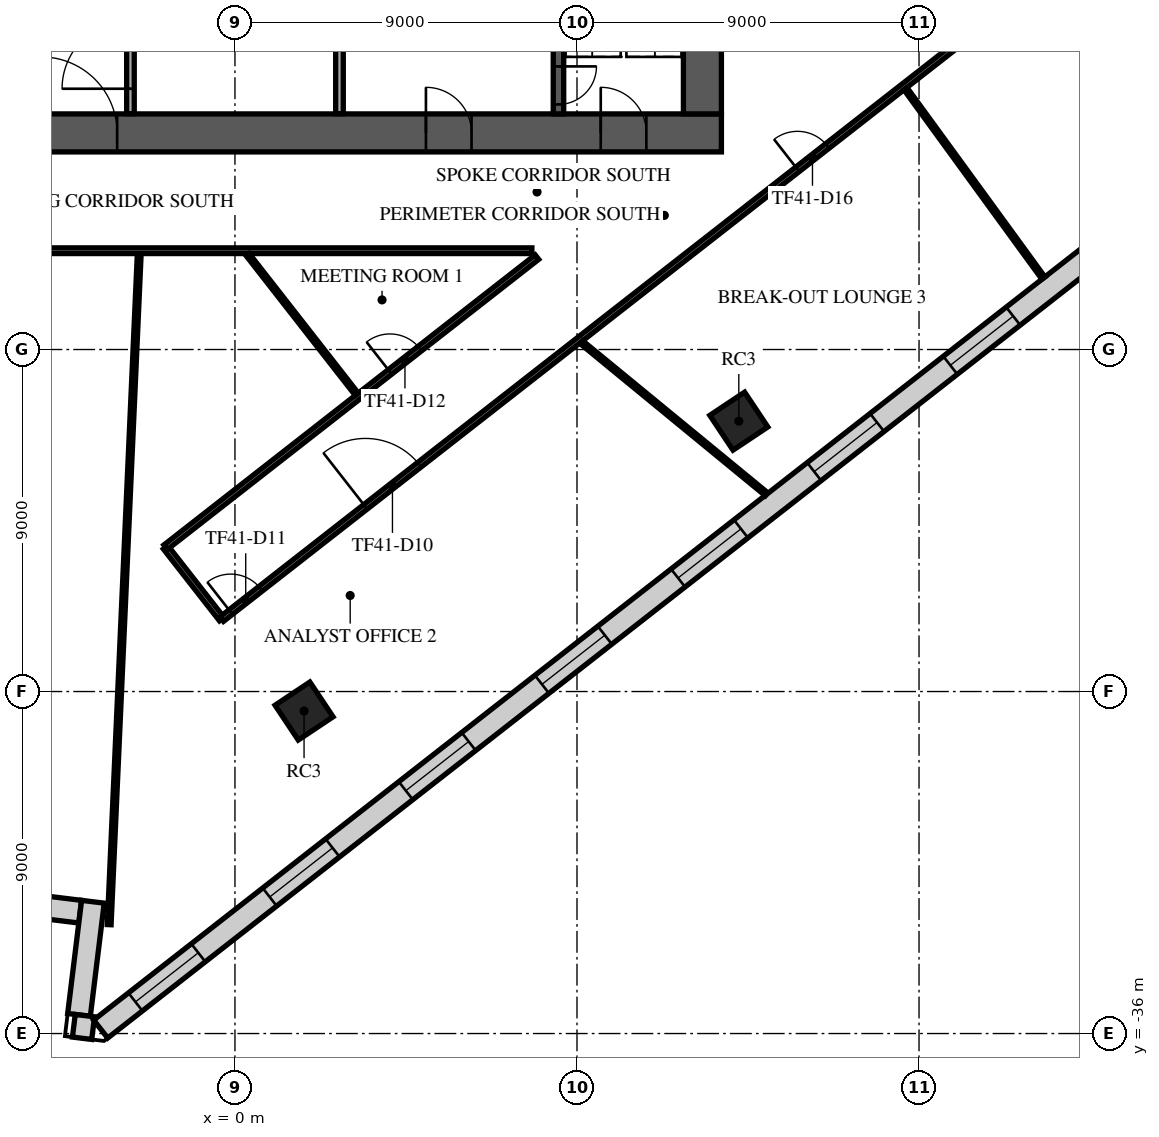
"""IFC4 building model, lengths in metres.
Left out: names, types, materials, properties, quantities, classifications, styles, units other than length and angle.
Written with IfcOpenShell. Run it as: python <this file> out.ifc"""

import sys

from ifc_helpers import new_model, si_unit, direction, frame, frame_2d, origin, origin_2d, place, context, subcontext, project, spatial, rectangle, extrude, element, fill, save


model = new_model("IFC4")
c1 = context("Model", 3, precision=1e-05, world=origin(), true_north=direction((0.0, 1.0)))
c2 = subcontext(c1, "Body", "Model", "MODEL_VIEW")
j1 = project(units=[si_unit("LENGTHUNIT", "METRE"), si_unit("PLANEANGLEUNIT", "RADIAN")], contexts=[c1])
p1 = place(None, origin())
s1 = spatial("IfcSite", under=j1, at=p1, CompositionType="ELEMENT")
p2 = place(p1, origin())
s2 = spatial("IfcBuilding", under=s1, at=p2, CompositionType="ELEMENT")
p3 = place(p2, frame((0.0, 0.0, 175.7)))
s3 = spatial("IfcBuildingStorey", under=s2, at=p3, CompositionType="ELEMENT", Elevation=175.7)
for number, where, z_axis, x_axis in (
    (1, (1.818, -27.513, 0.0), (0.0, 0.0, 1.0), (0.832, 0.555, 0.0)),
    (2, (13.258, -19.885, 0.0), (0.0, 0.0, 1.0), (0.832, 0.555, 0.0)),
):
    element("IfcColumn", number, at=place(p3, frame(where, z_axis=z_axis, x_axis=x_axis)), inside=s3, PredefinedType="COLUMN", context=c2, shape_type="SweptSolid", body=[
        extrude(rectangle(XDim=1.1, YDim=1.1, at=origin_2d()), origin(), (0.0, 0.0, 1.0), 4.0),
    ])
p4 = place(p3, frame((-12.8, -12.3, 0.0), z_axis=(0.0, 0.0, 1.0), x_axis=(1.0, 0.0, 0.0)))
e3 = element("IfcWall", 3, at=p4, inside=s3, PredefinedType="SHEAR", context=c2, shape_type="SweptSolid", body=[
    extrude(rectangle(XDim=25.6, YDim=1.0, at=frame_2d((12.8, 0.0))), origin(), (0.0, 0.0, 1.0), 3.6),
])
p5 = place(p4, frame((7.7, 0.0, 0.0)))
e4 = element("IfcOpeningElement", 4, at=p5, cuts=e3, PredefinedType="OPENING", context=c2, shape_type="SweptSolid", body=[
    extrude(rectangle(XDim=2.0, YDim=2.1, at=frame_2d((1.0, 1.05))), frame((0.0, 0.51, 0.0), z_axis=(0.0, -1.0, 0.0), x_axis=(1.0, 0.0, 0.0)), (0.0, 0.0, 1.0), 1.02),
])
p6 = place(p4, frame((17.825, 0.0, 0.0)))
e5 = element("IfcOpeningElement", 5, at=p6, cuts=e3, PredefinedType="OPENING", context=c2, shape_type="SweptSolid", body=[
    extrude(rectangle(XDim=1.2, YDim=2.1, at=frame_2d((0.6, 1.05))), frame((0.0, 0.51, 0.0), z_axis=(0.0, -1.0, 0.0), x_axis=(1.0, 0.0, 0.0)), (0.0, 0.0, 1.0), 1.02),
])
p7 = place(p4, frame((1.975, 0.0, 0.0)))
e6 = element("IfcOpeningElement", 6, at=p7, cuts=e3, PredefinedType="OPENING", context=c2, shape_type="SweptSolid", body=[
    extrude(rectangle(XDim=1.2, YDim=2.1, at=frame_2d((0.6, 1.05))), frame((0.0, 0.51, 0.0), z_axis=(0.0, -1.0, 0.0), x_axis=(1.0, 0.0, 0.0)), (0.0, 0.0, 1.0), 1.02),
])
p8 = place(p4, frame((22.425, 0.0, 0.0)))
e7 = element("IfcOpeningElement", 7, at=p8, cuts=e3, PredefinedType="OPENING", context=c2, shape_type="SweptSolid", body=[
    extrude(rectangle(XDim=1.2, YDim=2.1, at=frame_2d((0.6, 1.05))), frame((0.0, 0.51, 0.0), z_axis=(0.0, -1.0, 0.0), x_axis=(1.0, 0.0, 0.0)), (0.0, 0.0, 1.0), 1.02),
])
p9 = place(p3, frame((12.3, -11.8, 0.0), z_axis=(0.0, 0.0, 1.0), x_axis=(0.0, 1.0, 0.0)))
e8 = element("IfcWall", 8, at=p9, inside=s3, PredefinedType="SHEAR", context=c2, shape_type="SweptSolid", body=[
    extrude(rectangle(XDim=23.6, YDim=1.0, at=frame_2d((11.8, 0.0))), origin(), (0.0, 0.0, 1.0), 3.6),
])
p10 = place(p9, frame((10.6, 0.0, 0.0)))
e9 = element("IfcOpeningElement", 9, at=p10, cuts=e8, PredefinedType="OPENING", context=c2, shape_type="SweptSolid", body=[
    extrude(rectangle(XDim=2.4, YDim=2.4, at=frame_2d((1.2, 1.2))), frame((0.0, 0.51, 0.0), z_axis=(0.0, -1.0, 0.0), x_axis=(1.0, 0.0, 0.0)), (0.0, 0.0, 1.0), 1.02),
])
p11 = place(p3, frame((8.512, -4.55, 0.0), z_axis=(0.0, 0.0, 1.0), x_axis=(0.0, -1.0, 0.0)))
e10 = element("IfcWall", 10, at=p11, inside=s3, PredefinedType="SOLIDWALL", context=c2, shape_type="SweptSolid", body=[
    extrude(rectangle(XDim=7.25, YDim=0.275, at=frame_2d((3.625, 0.0))), origin(), (0.0, 0.0, 1.0), 3.6),
])
p12 = place(p11, frame((6.0, 0.0, 0.0)))
e11 = element("IfcOpeningElement", 11, at=p12, cuts=e10, PredefinedType="OPENING", context=c2, shape_type="SweptSolid", body=[
    extrude(rectangle(XDim=1.0, YDim=2.1, at=frame_2d((0.5, 1.05))), frame((0.0, 0.147, 0.0), z_axis=(0.0, -1.0, 0.0), x_axis=(1.0, 0.0, 0.0)), (0.0, 0.0, 1.0), 0.295),
])
p13 = place(p3, frame((-2.75, -11.795, 0.0), z_axis=(0.0, 0.0, 1.0), x_axis=(0.0, 1.0, 0.0)))
e12 = element("IfcWall", 12, at=p13, inside=s3, PredefinedType="PARTITIONING", context=c2, shape_type="SweptSolid", body=[
    extrude(rectangle(XDim=2.99, YDim=0.2, at=frame_2d((1.495, 0.0))), origin(), (0.0, 0.0, 1.0), 3.6),
])
p14 = place(p13, frame((0.657, 0.0, 0.0)))
e13 = element("IfcOpeningElement", 13, at=p14, cuts=e12, PredefinedType="OPENING", context=c2, shape_type="SweptSolid", body=[
    extrude(rectangle(XDim=1.8, YDim=2.1, at=frame_2d((0.9, 1.05))), frame((0.0, 0.11, 0.0), z_axis=(0.0, -1.0, 0.0), x_axis=(1.0, 0.0, 0.0)), (0.0, 0.0, 1.0), 0.22),
])
p15 = place(p3, frame((2.75, -11.795, 0.0), z_axis=(0.0, 0.0, 1.0), x_axis=(0.0, 1.0, 0.0)))
e14 = element("IfcWall", 14, at=p15, inside=s3, PredefinedType="PARTITIONING", context=c2, shape_type="SweptSolid", body=[
    extrude(rectangle(XDim=2.99, YDim=0.2, at=frame_2d((1.495, 0.0))), origin(), (0.0, 0.0, 1.0), 3.6),
])
p16 = place(p3, frame((-9.035, -32.184, 0.0), z_axis=(0.0, 0.0, 1.0), x_axis=(0.992545217041, -0.121876954874, 0.0)))
e15 = element("IfcWall", 15, at=p16, inside=s3, PredefinedType="STANDARD", context=c2, shape_type="SweptSolid", body=[
    extrude(rectangle(XDim=5.0, YDim=0.6, at=frame_2d((2.5, 0.0))), origin(), (0.0, 0.0, 1.0), 3.6),
])
p17 = place(p16, frame((1.2, 0.0, 0.9)))
e16 = element("IfcOpeningElement", 16, at=p17, cuts=e15, PredefinedType="OPENING", context=c2, shape_type="SweptSolid", body=[
    extrude(rectangle(XDim=2.6, YDim=2.1, at=frame_2d((1.3, 1.05))), frame((0.0, 0.31, 0.0), z_axis=(0.0, -1.0, 0.0), x_axis=(1.0, 0.0, 0.0)), (0.0, 0.0, 1.0), 0.62),
])
p18 = place(p3, frame((-3.738, -32.532, 0.0), z_axis=(0.0, 0.0, 1.0), x_axis=(-0.121901146576, -0.992542246186, 0.0)))
e17 = element("IfcWall", 17, at=p18, inside=s3, PredefinedType="STANDARD", context=c2, shape_type="SweptSolid", body=[
    extrude(rectangle(XDim=3.0, YDim=0.6, at=frame_2d((1.5, 0.0))), origin(), (0.0, 0.0, 1.0), 3.6),
])
p19 = place(p3, frame((-4.24, -35.795, 0.0), z_axis=(0.0, 0.0, 1.0), x_axis=(0.992554603024, -0.121800492671, 0.0)))
e18 = element("IfcWall", 18, at=p19, inside=s3, PredefinedType="STANDARD", context=c2, shape_type="SweptSolid", body=[
    extrude(rectangle(XDim=0.511, YDim=0.6, at=frame_2d((0.256, 0.0))), origin(), (0.0, 0.0, 1.0), 3.6),
])
p20 = place(p3, frame((-3.534, -35.882, 0.0), z_axis=(0.0, 0.0, 1.0), x_axis=(0.788011205374, 0.61566089709, 0.0)))
e19 = element("IfcWall", 19, at=p20, inside=s3, PredefinedType="STANDARD", context=c2, shape_type="SweptSolid", body=[
    extrude(rectangle(XDim=49.752, YDim=0.6, at=frame_2d((24.876, 0.0))), origin(), (0.0, 0.0, 1.0), 3.6),
])
p21 = place(p20, frame((1.161, 0.0, 0.9)))
e20 = element("IfcOpeningElement", 20, at=p21, cuts=e19, PredefinedType="OPENING", context=c2, shape_type="SweptSolid", body=[
    extrude(rectangle(XDim=2.1, YDim=2.1, at=frame_2d((1.05, 1.05))), frame((0.0, 0.31, 0.0), z_axis=(0.0, -1.0, 0.0), x_axis=(1.0, 0.0, 0.0)), (0.0, 0.0, 1.0), 0.62),
])
p22 = place(p20, frame((5.644, 0.0, 0.9)))
e21 = element("IfcOpeningElement", 21, at=p22, cuts=e19, PredefinedType="OPENING", context=c2, shape_type="SweptSolid", body=[
    extrude(rectangle(XDim=2.1, YDim=2.1, at=frame_2d((1.05, 1.05))), frame((0.0, 0.31, 0.0), z_axis=(0.0, -1.0, 0.0), x_axis=(1.0, 0.0, 0.0)), (0.0, 0.0, 1.0), 0.62),
])
p23 = place(p20, frame((10.189, 0.0, 0.9)))
e22 = element("IfcOpeningElement", 22, at=p23, cuts=e19, PredefinedType="OPENING", context=c2, shape_type="SweptSolid", body=[
    extrude(rectangle(XDim=2.1, YDim=2.1, at=frame_2d((1.05, 1.05))), frame((0.0, 0.31, 0.0), z_axis=(0.0, -1.0, 0.0), x_axis=(1.0, 0.0, 0.0)), (0.0, 0.0, 1.0), 0.62),
])
p24 = place(p20, frame((14.735, 0.0, 0.9)))
e23 = element("IfcOpeningElement", 23, at=p24, cuts=e19, PredefinedType="OPENING", context=c2, shape_type="SweptSolid", body=[
    extrude(rectangle(XDim=2.1, YDim=2.1, at=frame_2d((1.05, 1.05))), frame((0.0, 0.31, 0.0), z_axis=(0.0, -1.0, 0.0), x_axis=(1.0, 0.0, 0.0)), (0.0, 0.0, 1.0), 0.62),
])
p25 = place(p20, frame((19.28, 0.0, 0.9)))
e24 = element("IfcOpeningElement", 24, at=p25, cuts=e19, PredefinedType="OPENING", context=c2, shape_type="SweptSolid", body=[
    extrude(rectangle(XDim=2.1, YDim=2.1, at=frame_2d((1.05, 1.05))), frame((0.0, 0.31, 0.0), z_axis=(0.0, -1.0, 0.0), x_axis=(1.0, 0.0, 0.0)), (0.0, 0.0, 1.0), 0.62),
])
p26 = place(p20, frame((23.826, 0.0, 0.9)))
e25 = element("IfcOpeningElement", 25, at=p26, cuts=e19, PredefinedType="OPENING", context=c2, shape_type="SweptSolid", body=[
    extrude(rectangle(XDim=2.1, YDim=2.1, at=frame_2d((1.05, 1.05))), frame((0.0, 0.31, 0.0), z_axis=(0.0, -1.0, 0.0), x_axis=(1.0, 0.0, 0.0)), (0.0, 0.0, 1.0), 0.62),
])
p27 = place(p20, frame((28.371, 0.0, 0.9)))
e26 = element("IfcOpeningElement", 26, at=p27, cuts=e19, PredefinedType="OPENING", context=c2, shape_type="SweptSolid", body=[
    extrude(rectangle(XDim=2.1, YDim=2.1, at=frame_2d((1.05, 1.05))), frame((0.0, 0.31, 0.0), z_axis=(0.0, -1.0, 0.0), x_axis=(1.0, 0.0, 0.0)), (0.0, 0.0, 1.0), 0.62),
])
p28 = place(p20, frame((32.917, 0.0, 0.9)))
e27 = element("IfcOpeningElement", 27, at=p28, cuts=e19, PredefinedType="OPENING", context=c2, shape_type="SweptSolid", body=[
    extrude(rectangle(XDim=2.1, YDim=2.1, at=frame_2d((1.05, 1.05))), frame((0.0, 0.31, 0.0), z_axis=(0.0, -1.0, 0.0), x_axis=(1.0, 0.0, 0.0)), (0.0, 0.0, 1.0), 0.62),
])
p29 = place(p20, frame((37.462, 0.0, 0.9)))
e28 = element("IfcOpeningElement", 28, at=p29, cuts=e19, PredefinedType="OPENING", context=c2, shape_type="SweptSolid", body=[
    extrude(rectangle(XDim=2.1, YDim=2.1, at=frame_2d((1.05, 1.05))), frame((0.0, 0.31, 0.0), z_axis=(0.0, -1.0, 0.0), x_axis=(1.0, 0.0, 0.0)), (0.0, 0.0, 1.0), 0.62),
])
p30 = place(p20, frame((42.008, 0.0, 0.9)))
e29 = element("IfcOpeningElement", 29, at=p30, cuts=e19, PredefinedType="OPENING", context=c2, shape_type="SweptSolid", body=[
    extrude(rectangle(XDim=2.1, YDim=2.1, at=frame_2d((1.05, 1.05))), frame((0.0, 0.31, 0.0), z_axis=(0.0, -1.0, 0.0), x_axis=(1.0, 0.0, 0.0)), (0.0, 0.0, 1.0), 0.62),
])
p31 = place(p20, frame((46.491, 0.0, 0.9)))
e30 = element("IfcOpeningElement", 30, at=p31, cuts=e19, PredefinedType="OPENING", context=c2, shape_type="SweptSolid", body=[
    extrude(rectangle(XDim=2.1, YDim=2.1, at=frame_2d((1.05, 1.05))), frame((0.0, 0.31, 0.0), z_axis=(0.0, -1.0, 0.0), x_axis=(1.0, 0.0, 0.0)), (0.0, 0.0, 1.0), 0.62),
])
p32 = place(p3, frame((-14.312, -15.4, 0.0), z_axis=(0.0, 0.0, 1.0), x_axis=(1.0, 0.0, 0.0)))
e31 = element("IfcWall", 31, at=p32, inside=s3, PredefinedType="PARTITIONING", context=c2, shape_type="SweptSolid", body=[
    extrude(rectangle(XDim=22.125, YDim=0.15, at=frame_2d((11.062, 0.0))), origin(), (0.0, 0.0, 1.0), 3.15),
])
p33 = place(p3, frame((-1.825, -23.204, 0.0), z_axis=(0.0, 0.0, 1.0), x_axis=(0.615792170082, -0.787908626216, 0.0)))
e32 = element("IfcWall", 32, at=p33, inside=s3, PredefinedType="PARTITIONING", context=c2, shape_type="SweptSolid", body=[
    extrude(rectangle(XDim=2.399, YDim=0.15, at=frame_2d((1.199, 0.0))), origin(), (0.0, 0.0, 1.0), 3.6),
])
p34 = place(p3, frame((-1.825, -23.203, 0.0), z_axis=(0.0, 0.0, 1.0), x_axis=(0.788016612455, 0.615653976269, 0.0)))
e33 = element("IfcWall", 33, at=p34, inside=s3, PredefinedType="PARTITIONING", context=c2, shape_type="SweptSolid", body=[
    extrude(rectangle(XDim=12.399, YDim=0.15, at=frame_2d((6.2, 0.0))), origin(), (0.0, 0.0, 1.0), 3.15),
])
p35 = place(p34, frame((7.492, 0.0, 0.0)))
e34 = element("IfcOpeningElement", 34, at=p35, cuts=e33, PredefinedType="OPENING", context=c2, shape_type="SweptSolid", body=[
    extrude(rectangle(XDim=1.0, YDim=2.1, at=frame_2d((0.5, 1.05))), frame((0.0, 0.085, 0.0), z_axis=(0.0, -1.0, 0.0), x_axis=(1.0, 0.0, 0.0)), (0.0, 0.0, 1.0), 0.17),
])
p36 = place(p3, frame((-0.348, -25.095, 0.0), z_axis=(0.0, 0.0, 1.0), x_axis=(0.788010131951, 0.615662271008, 0.0)))
e35 = element("IfcWall", 35, at=p36, inside=s3, PredefinedType="PARTITIONING", context=c2, shape_type="SweptSolid", body=[
    extrude(rectangle(XDim=31.448, YDim=0.15, at=frame_2d((15.724, 0.0))), origin(), (0.0, 0.0, 1.0), 3.15),
])
p37 = place(p36, frame((4.801, 0.0, 0.0)))
e36 = element("IfcOpeningElement", 36, at=p37, cuts=e35, PredefinedType="OPENING", context=c2, shape_type="SweptSolid", body=[
    extrude(rectangle(XDim=1.8, YDim=2.1, at=frame_2d((0.9, 1.05))), frame((0.0, 0.085, 0.0), z_axis=(0.0, -1.0, 0.0), x_axis=(1.0, 0.0, 0.0)), (0.0, 0.0, 1.0), 0.17),
])
p38 = place(p36, frame((0.301, 0.0, 0.0)))
e37 = element("IfcOpeningElement", 37, at=p38, cuts=e35, PredefinedType="OPENING", context=c2, shape_type="SweptSolid", body=[
    extrude(rectangle(XDim=1.0, YDim=2.1, at=frame_2d((0.5, 1.05))), frame((0.0, 0.085, 0.0), z_axis=(0.0, -1.0, 0.0), x_axis=(1.0, 0.0, 0.0)), (0.0, 0.0, 1.0), 0.17),
])
p39 = place(p36, frame((19.226, 0.0, 0.0)))
e38 = element("IfcOpeningElement", 38, at=p39, cuts=e35, PredefinedType="OPENING", context=c2, shape_type="SweptSolid", body=[
    extrude(rectangle(XDim=1.0, YDim=2.1, at=frame_2d((0.5, 1.05))), frame((0.0, 0.085, 0.0), z_axis=(0.0, -1.0, 0.0), x_axis=(1.0, 0.0, 0.0)), (0.0, 0.0, 1.0), 0.17),
])
p40 = place(p36, frame((30.072, 0.0, 0.0)))
e39 = element("IfcOpeningElement", 39, at=p40, cuts=e35, PredefinedType="OPENING", context=c2, shape_type="SweptSolid", body=[
    extrude(rectangle(XDim=1.0, YDim=2.1, at=frame_2d((0.5, 1.05))), frame((0.0, 0.085, 0.0), z_axis=(0.0, -1.0, 0.0), x_axis=(1.0, 0.0, 0.0)), (0.0, 0.0, 1.0), 0.17),
])
p41 = place(p3, frame((-3.31, -33.135, 0.0), z_axis=(0.0, 0.0, 1.0), x_axis=(0.044752286744, 0.998998114528, 0.0)))
e40 = element("IfcWall", 40, at=p41, inside=s3, PredefinedType="PARTITIONING", context=c2, shape_type="SweptSolid", body=[
    extrude(rectangle(XDim=17.676, YDim=0.1, at=frame_2d((8.838, 0.0))), origin(), (0.0, 0.0, 1.0), 2.9),
])
p42 = place(p3, frame((0.337, -15.506, 0.0), z_axis=(0.0, 0.0, 1.0), x_axis=(0.615683690883, -0.787993396407, 0.0)))
e41 = element("IfcWall", 41, at=p42, inside=s3, PredefinedType="PARTITIONING", context=c2, shape_type="SweptSolid", body=[
    extrude(rectangle(XDim=4.66, YDim=0.1, at=frame_2d((2.33, 0.0))), origin(), (0.0, 0.0, 1.0), 3.15),
])
p43 = place(p3, frame((9.118, -17.809, 0.0), z_axis=(0.0, 0.0, 1.0), x_axis=(0.772739146609, -0.634723728324, 0.0)))
e42 = element("IfcWall", 42, at=p43, inside=s3, PredefinedType="PARTITIONING", context=c2, shape_type="SweptSolid", body=[
    extrude(rectangle(XDim=6.303, YDim=0.1, at=frame_2d((3.151, 0.0))), origin(), (0.0, 0.0, 1.0), 2.9),
])
p44 = place(p3, frame((17.643, -11.136, 0.0), z_axis=(0.0, 0.0, 1.0), x_axis=(0.588621430422, -0.808408814677, 0.0)))
e43 = element("IfcWall", 43, at=p44, inside=s3, PredefinedType="PARTITIONING", context=c2, shape_type="SweptSolid", body=[
    extrude(rectangle(XDim=6.164, YDim=0.1, at=frame_2d((3.082, 0.0))), origin(), (0.0, 0.0, 1.0), 2.9),
])
p45 = place(p5, origin())
e44 = element("IfcDoor", 44, at=p45, inside=s3, OperationType="SINGLE_SWING_LEFT", PredefinedType="DOOR", context=c2, shape_type="SweptSolid", body=[
    extrude(rectangle(XDim=2.0, YDim=2.1, at=frame_2d((1.0, 1.05))), frame((0.0, 0.025, 0.0), z_axis=(0.0, -1.0, 0.0), x_axis=(1.0, 0.0, 0.0)), (0.0, 0.0, 1.0), 0.05),
])
fill(e4, e44)
p46 = place(p6, origin())
e45 = element("IfcDoor", 45, at=p46, inside=s3, OperationType="SINGLE_SWING_LEFT", PredefinedType="DOOR", context=c2, shape_type="SweptSolid", body=[
    extrude(rectangle(XDim=1.2, YDim=2.1, at=frame_2d((0.6, 1.05))), frame((0.0, 0.025, 0.0), z_axis=(0.0, -1.0, 0.0), x_axis=(1.0, 0.0, 0.0)), (0.0, 0.0, 1.0), 0.05),
])
fill(e5, e45)
p47 = place(p8, origin())
e46 = element("IfcDoor", 46, at=p47, inside=s3, OperationType="SINGLE_SWING_LEFT", PredefinedType="DOOR", context=c2, shape_type="SweptSolid", body=[
    extrude(rectangle(XDim=1.2, YDim=2.1, at=frame_2d((0.6, 1.05))), frame((0.0, 0.025, 0.0), z_axis=(0.0, -1.0, 0.0), x_axis=(1.0, 0.0, 0.0)), (0.0, 0.0, 1.0), 0.05),
])
fill(e7, e46)
p48 = place(p12, origin())
e47 = element("IfcDoor", 47, at=p48, inside=s3, OperationType="SINGLE_SWING_LEFT", PredefinedType="DOOR", context=c2, shape_type="SweptSolid", body=[
    extrude(rectangle(XDim=1.0, YDim=2.1, at=frame_2d((0.5, 1.05))), frame((0.0, 0.025, 0.0), z_axis=(0.0, -1.0, 0.0), x_axis=(1.0, 0.0, 0.0)), (0.0, 0.0, 1.0), 0.05),
])
fill(e11, e47)
p49 = place(p14, origin())
e48 = element("IfcDoor", 48, at=p49, inside=s3, OperationType="SINGLE_SWING_LEFT", PredefinedType="DOOR", context=c2, shape_type="SweptSolid", body=[
    extrude(rectangle(XDim=1.8, YDim=2.1, at=frame_2d((0.9, 1.05))), frame((0.0, 0.025, 0.0), z_axis=(0.0, -1.0, 0.0), x_axis=(1.0, 0.0, 0.0)), (0.0, 0.0, 1.0), 0.05),
])
fill(e13, e48)
p50 = place(p21, origin())
e49 = element("IfcWindow", 49, at=p50, inside=s3, PartitioningType="SINGLE_PANEL", PredefinedType="WINDOW", context=c2, shape_type="SweptSolid", body=[
    extrude(rectangle(XDim=2.1, YDim=2.1, at=frame_2d((1.05, 1.05))), frame((0.0, 0.03, 0.0), z_axis=(0.0, -1.0, 0.0), x_axis=(1.0, 0.0, 0.0)), (0.0, 0.0, 1.0), 0.06),
])
fill(e20, e49)
p51 = place(p22, origin())
e50 = element("IfcWindow", 50, at=p51, inside=s3, PartitioningType="SINGLE_PANEL", PredefinedType="WINDOW", context=c2, shape_type="SweptSolid", body=[
    extrude(rectangle(XDim=2.1, YDim=2.1, at=frame_2d((1.05, 1.05))), frame((0.0, 0.03, 0.0), z_axis=(0.0, -1.0, 0.0), x_axis=(1.0, 0.0, 0.0)), (0.0, 0.0, 1.0), 0.06),
])
fill(e21, e50)
p52 = place(p23, origin())
e51 = element("IfcWindow", 51, at=p52, inside=s3, PartitioningType="SINGLE_PANEL", PredefinedType="WINDOW", context=c2, shape_type="SweptSolid", body=[
    extrude(rectangle(XDim=2.1, YDim=2.1, at=frame_2d((1.05, 1.05))), frame((0.0, 0.03, 0.0), z_axis=(0.0, -1.0, 0.0), x_axis=(1.0, 0.0, 0.0)), (0.0, 0.0, 1.0), 0.06),
])
fill(e22, e51)
p53 = place(p24, origin())
e52 = element("IfcWindow", 52, at=p53, inside=s3, PartitioningType="SINGLE_PANEL", PredefinedType="WINDOW", context=c2, shape_type="SweptSolid", body=[
    extrude(rectangle(XDim=2.1, YDim=2.1, at=frame_2d((1.05, 1.05))), frame((0.0, 0.03, 0.0), z_axis=(0.0, -1.0, 0.0), x_axis=(1.0, 0.0, 0.0)), (0.0, 0.0, 1.0), 0.06),
])
fill(e23, e52)
p54 = place(p25, origin())
e53 = element("IfcWindow", 53, at=p54, inside=s3, PartitioningType="SINGLE_PANEL", PredefinedType="WINDOW", context=c2, shape_type="SweptSolid", body=[
    extrude(rectangle(XDim=2.1, YDim=2.1, at=frame_2d((1.05, 1.05))), frame((0.0, 0.03, 0.0), z_axis=(0.0, -1.0, 0.0), x_axis=(1.0, 0.0, 0.0)), (0.0, 0.0, 1.0), 0.06),
])
fill(e24, e53)
p55 = place(p26, origin())
e54 = element("IfcWindow", 54, at=p55, inside=s3, PartitioningType="SINGLE_PANEL", PredefinedType="WINDOW", context=c2, shape_type="SweptSolid", body=[
    extrude(rectangle(XDim=2.1, YDim=2.1, at=frame_2d((1.05, 1.05))), frame((0.0, 0.03, 0.0), z_axis=(0.0, -1.0, 0.0), x_axis=(1.0, 0.0, 0.0)), (0.0, 0.0, 1.0), 0.06),
])
fill(e25, e54)
p56 = place(p27, origin())
e55 = element("IfcWindow", 55, at=p56, inside=s3, PartitioningType="SINGLE_PANEL", PredefinedType="WINDOW", context=c2, shape_type="SweptSolid", body=[
    extrude(rectangle(XDim=2.1, YDim=2.1, at=frame_2d((1.05, 1.05))), frame((0.0, 0.03, 0.0), z_axis=(0.0, -1.0, 0.0), x_axis=(1.0, 0.0, 0.0)), (0.0, 0.0, 1.0), 0.06),
])
fill(e26, e55)
p57 = place(p37, frame((1.8, 0.0, 0.0), z_axis=(0.0, 0.0, 1.0), x_axis=(-1.0, 0.0, 0.0)))
e56 = element("IfcDoor", 56, at=p57, inside=s3, OperationType="DOUBLE_DOOR_SINGLE_SWING", PredefinedType="DOOR", context=c2, shape_type="SweptSolid", body=[
    extrude(rectangle(XDim=1.8, YDim=2.1, at=frame_2d((0.9, 1.05))), frame((0.0, 0.025, 0.0), z_axis=(0.0, -1.0, 0.0), x_axis=(1.0, 0.0, 0.0)), (0.0, 0.0, 1.0), 0.05),
])
fill(e36, e56)
p58 = place(p38, frame((1.0, 0.0, 0.0), z_axis=(0.0, 0.0, 1.0), x_axis=(-1.0, 0.0, 0.0)))
e57 = element("IfcDoor", 57, at=p58, inside=s3, OperationType="SINGLE_SWING_RIGHT", PredefinedType="DOOR", context=c2, shape_type="SweptSolid", body=[
    extrude(rectangle(XDim=1.0, YDim=2.1, at=frame_2d((0.5, 1.05))), frame((0.0, 0.025, 0.0), z_axis=(0.0, -1.0, 0.0), x_axis=(1.0, 0.0, 0.0)), (0.0, 0.0, 1.0), 0.05),
])
fill(e37, e57)
p59 = place(p35, origin())
e58 = element("IfcDoor", 58, at=p59, inside=s3, OperationType="SINGLE_SWING_LEFT", PredefinedType="DOOR", context=c2, shape_type="SweptSolid", body=[
    extrude(rectangle(XDim=1.0, YDim=2.1, at=frame_2d((0.5, 1.05))), frame((0.0, 0.025, 0.0), z_axis=(0.0, -1.0, 0.0), x_axis=(1.0, 0.0, 0.0)), (0.0, 0.0, 1.0), 0.05),
])
fill(e34, e58)
p60 = place(p39, frame((1.0, 0.0, 0.0), z_axis=(0.0, 0.0, 1.0), x_axis=(-1.0, 0.0, 0.0)))
e59 = element("IfcDoor", 59, at=p60, inside=s3, OperationType="SINGLE_SWING_RIGHT", PredefinedType="DOOR", context=c2, shape_type="SweptSolid", body=[
    extrude(rectangle(XDim=1.0, YDim=2.1, at=frame_2d((0.5, 1.05))), frame((0.0, 0.025, 0.0), z_axis=(0.0, -1.0, 0.0), x_axis=(1.0, 0.0, 0.0)), (0.0, 0.0, 1.0), 0.05),
])
fill(e38, e59)
save(model, sys.argv[1])
